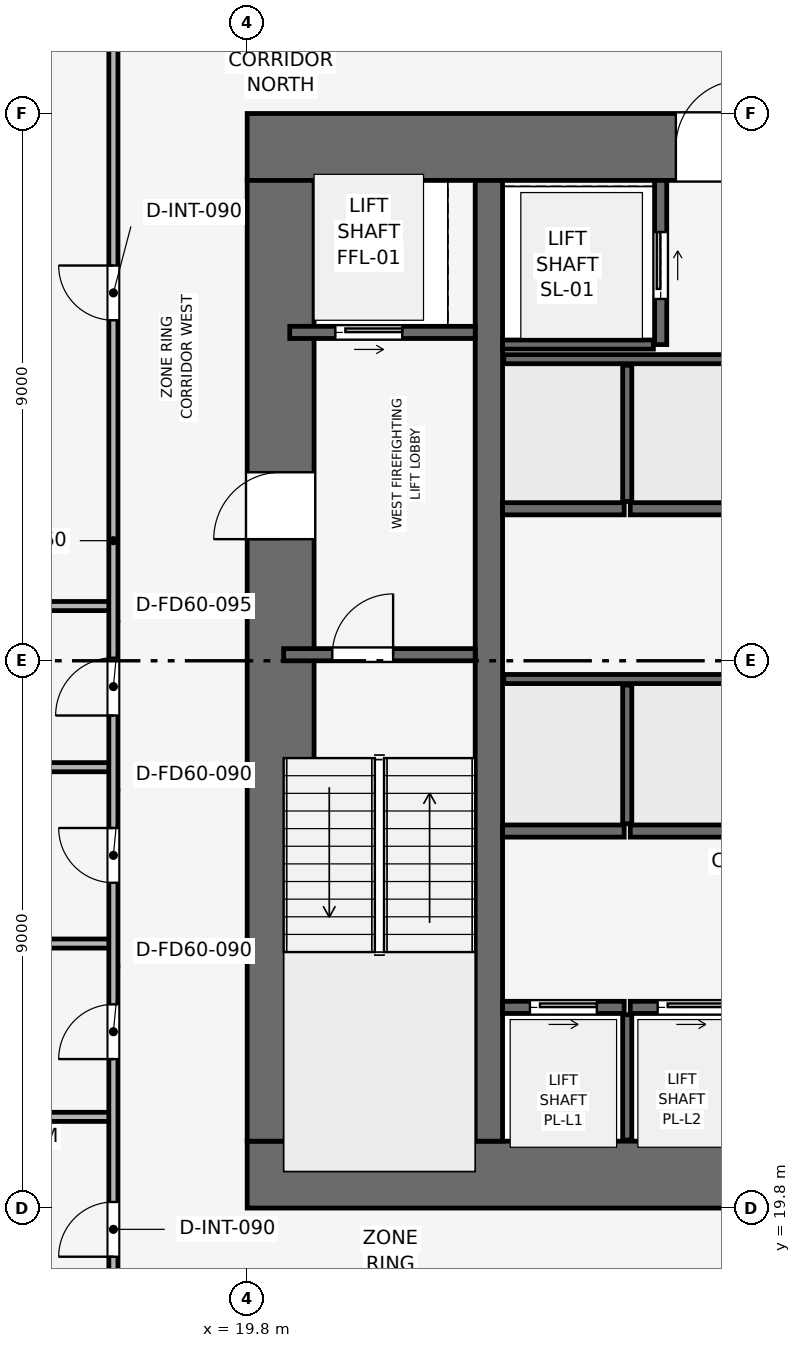
"""IFC4 building model, lengths in metres.
Left out: names, types, materials, properties, quantities, classifications, styles, units other than length and angle.
Written with IfcOpenShell. Run it as: python <this file> out.ifc"""

import sys

from ifc_helpers import new_model, si_unit, direction, frame, frame_2d, origin, place, context, subcontext, project, spatial, rectangle, extrude, element, fill, save


model = new_model("IFC4")
c1 = context("Model", 3, precision=1e-05, world=origin(), true_north=direction((0.0, 1.0)))
c2 = subcontext(c1, "Body", "Model", "MODEL_VIEW")
j1 = project(units=[si_unit("LENGTHUNIT", "METRE"), si_unit("PLANEANGLEUNIT", "RADIAN")], contexts=[c1])
p1 = place(None, origin())
s1 = spatial("IfcSite", under=j1, at=p1, CompositionType="ELEMENT")
p2 = place(p1, origin())
s2 = spatial("IfcBuilding", under=s1, at=p2, CompositionType="ELEMENT")
p3 = place(p2, frame((0.0, 0.0, 104.1)))
s3 = spatial("IfcBuildingStorey", under=s2, at=p3, CompositionType="ELEMENT", Elevation=104.1)
p4 = place(p3, frame((19.8, 20.35, 0.0), z_axis=(0.0, 0.0, 1.0), x_axis=(1.0, 0.0, 0.0)))
e1 = element("IfcWall", 1, at=p4, inside=s3, PredefinedType="SHEAR", context=c2, shape_type="SweptSolid", body=[
    extrude(rectangle(XDim=18.0, YDim=1.1, at=frame_2d((9.0, 0.0))), origin(), (0.0, 0.0, 1.0), 3.9),
])
p5 = place(p4, frame((8.4, 0.0, 0.0)))
e2 = element("IfcOpeningElement", 2, at=p5, cuts=e1, PredefinedType="OPENING", context=c2, shape_type="SweptSolid", body=[
    extrude(rectangle(XDim=1.2, YDim=2.2, at=frame_2d((0.6, 1.1))), frame((0.0, 0.56, 0.0), z_axis=(0.0, -1.0, 0.0), x_axis=(1.0, 0.0, 0.0)), (0.0, 0.0, 1.0), 1.12),
])
p6 = place(p3, frame((19.8, 37.25, 0.0), z_axis=(0.0, 0.0, 1.0), x_axis=(1.0, 0.0, 0.0)))
e3 = element("IfcWall", 3, at=p6, inside=s3, PredefinedType="SHEAR", context=c2, shape_type="SweptSolid", body=[
    extrude(rectangle(XDim=18.0, YDim=1.1, at=frame_2d((9.0, 0.0))), origin(), (0.0, 0.0, 1.0), 3.9),
])
p7 = place(p6, frame((7.05, 0.0, 0.0)))
e4 = element("IfcOpeningElement", 4, at=p7, cuts=e3, PredefinedType="OPENING", context=c2, shape_type="SweptSolid", body=[
    extrude(rectangle(XDim=1.1, YDim=2.15, at=frame_2d((0.55, 1.075))), frame((0.0, 0.56, 0.0), z_axis=(0.0, -1.0, 0.0), x_axis=(1.0, 0.0, 0.0)), (0.0, 0.0, 1.0), 1.12),
])
p8 = place(p3, frame((20.35, 20.9, 0.0), z_axis=(0.0, 0.0, 1.0), x_axis=(0.0, 1.0, 0.0)))
e5 = element("IfcWall", 5, at=p8, inside=s3, PredefinedType="SHEAR", context=c2, shape_type="SweptSolid", body=[
    extrude(rectangle(XDim=15.8, YDim=1.1, at=frame_2d((7.9, 0.0))), origin(), (0.0, 0.0, 1.0), 3.9),
])
p9 = place(p8, frame((9.9, 0.0, 0.0)))
e6 = element("IfcOpeningElement", 6, at=p9, cuts=e5, PredefinedType="OPENING", context=c2, shape_type="SweptSolid", body=[
    extrude(rectangle(XDim=1.1, YDim=2.15, at=frame_2d((0.55, 1.075))), frame((0.0, 0.56, 0.0), z_axis=(0.0, -1.0, 0.0), x_axis=(1.0, 0.0, 0.0)), (0.0, 0.0, 1.0), 1.12),
])
p10 = place(p3, frame((23.775, 20.9, 0.0), z_axis=(0.0, 0.0, 1.0), x_axis=(0.0, 1.0, 0.0)))
e7 = element("IfcWall", 7, at=p10, inside=s3, PredefinedType="SHEAR", context=c2, shape_type="SweptSolid", body=[
    extrude(rectangle(XDim=15.8, YDim=0.45, at=frame_2d((7.9, 0.0))), origin(), (0.0, 0.0, 1.0), 3.9),
])
p11 = place(p3, frame((20.4, 28.9, 0.0), z_axis=(0.0, 0.0, 1.0), x_axis=(1.0, 0.0, 0.0)))
e8 = element("IfcWall", 8, at=p11, inside=s3, PredefinedType="SHEAR", context=c2, shape_type="SweptSolid", body=[
    extrude(rectangle(XDim=3.15, YDim=0.2, at=frame_2d((1.575, 0.0))), origin(), (0.0, 0.0, 1.0), 3.54),
])
p12 = place(p11, frame((0.8, 0.0, 0.0)))
e9 = element("IfcOpeningElement", 9, at=p12, cuts=e8, PredefinedType="OPENING", context=c2, shape_type="SweptSolid", body=[
    extrude(rectangle(XDim=1.0, YDim=2.1, at=frame_2d((0.5, 1.05))), frame((0.0, 0.11, 0.0), z_axis=(0.0, -1.0, 0.0), x_axis=(1.0, 0.0, 0.0)), (0.0, 0.0, 1.0), 0.22),
])
p13 = place(p3, frame((20.5, 34.2, 0.0), z_axis=(0.0, 0.0, 1.0), x_axis=(1.0, 0.0, 0.0)))
e10 = element("IfcWall", 10, at=p13, inside=s3, PredefinedType="SHEAR", context=c2, shape_type="SweptSolid", body=[
    extrude(rectangle(XDim=3.05, YDim=0.2, at=frame_2d((1.525, 0.0))), origin(), (0.0, 0.0, 1.0), 3.54),
])
p14 = place(p13, frame((0.75, 0.0, 0.0)))
e11 = element("IfcOpeningElement", 11, at=p14, cuts=e10, PredefinedType="OPENING", context=c2, shape_type="SweptSolid", body=[
    extrude(rectangle(XDim=1.1, YDim=2.15, at=frame_2d((0.55, 1.075))), frame((0.0, 0.11, 0.0), z_axis=(0.0, -1.0, 0.0), x_axis=(1.0, 0.0, 0.0)), (0.0, 0.0, 1.0), 0.22),
])
p15 = place(p3, frame((26.6, 34.0, 0.0), z_axis=(0.0, 0.0, 1.0), x_axis=(0.0, 1.0, 0.0)))
e12 = element("IfcWall", 12, at=p15, inside=s3, PredefinedType="SHEAR", context=c2, shape_type="SweptSolid", body=[
    extrude(rectangle(XDim=2.7, YDim=0.2, at=frame_2d((1.35, 0.0))), origin(), (0.0, 0.0, 1.0), 3.54),
])
p16 = place(p15, frame((0.75, 0.0, 0.0)))
e13 = element("IfcOpeningElement", 13, at=p16, cuts=e12, PredefinedType="OPENING", context=c2, shape_type="SweptSolid", body=[
    extrude(rectangle(XDim=1.1, YDim=2.15, at=frame_2d((0.55, 1.075))), frame((0.0, 0.11, 0.0), z_axis=(0.0, -1.0, 0.0), x_axis=(1.0, 0.0, 0.0)), (0.0, 0.0, 1.0), 0.22),
])
p17 = place(p3, frame((24.0, 34.0, 0.0), z_axis=(0.0, 0.0, 1.0), x_axis=(1.0, 0.0, 0.0)))
e14 = element("IfcWall", 14, at=p17, inside=s3, PredefinedType="SHEAR", context=c2, shape_type="SweptSolid", body=[
    extrude(rectangle(XDim=2.48, YDim=0.15, at=frame_2d((1.24, 0.0))), origin(), (0.0, 0.0, 1.0), 3.54),
])
p18 = place(p3, frame((24.0, 23.1, 0.0), z_axis=(0.0, 0.0, 1.0), x_axis=(1.0, 0.0, 0.0)))
e15 = element("IfcWall", 15, at=p18, inside=s3, PredefinedType="SHEAR", context=c2, shape_type="SweptSolid", body=[
    extrude(rectangle(XDim=2.0, YDim=0.2, at=frame_2d((1.0, 0.0))), origin(), (0.0, 0.0, 1.0), 3.54),
])
p19 = place(p18, frame((0.45, 0.0, 0.0)))
e16 = element("IfcOpeningElement", 16, at=p19, cuts=e15, PredefinedType="OPENING", context=c2, shape_type="SweptSolid", body=[
    extrude(rectangle(XDim=1.1, YDim=2.15, at=frame_2d((0.55, 1.075))), frame((0.0, 0.11, 0.0), z_axis=(0.0, -1.0, 0.0), x_axis=(1.0, 0.0, 0.0)), (0.0, 0.0, 1.0), 0.22),
])
p20 = place(p3, frame((26.1, 23.1, 0.0), z_axis=(0.0, 0.0, 1.0), x_axis=(1.0, 0.0, 0.0)))
e17 = element("IfcWall", 17, at=p20, inside=s3, PredefinedType="SHEAR", context=c2, shape_type="SweptSolid", body=[
    extrude(rectangle(XDim=2.0, YDim=0.2, at=frame_2d((1.0, 0.0))), origin(), (0.0, 0.0, 1.0), 3.54),
])
p21 = place(p20, frame((0.45, 0.0, 0.0)))
e18 = element("IfcOpeningElement", 18, at=p21, cuts=e17, PredefinedType="OPENING", context=c2, shape_type="SweptSolid", body=[
    extrude(rectangle(XDim=1.1, YDim=2.15, at=frame_2d((0.55, 1.075))), frame((0.0, 0.11, 0.0), z_axis=(0.0, -1.0, 0.0), x_axis=(1.0, 0.0, 0.0)), (0.0, 0.0, 1.0), 0.22),
])
for number, where, z_axis, x_axis in (
    (19, (24.0, 26.0, 0.0), (0.0, 0.0, 1.0), (1.0, 0.0, 0.0)),
    (20, (26.1, 26.0, 0.0), (0.0, 0.0, 1.0), (1.0, 0.0, 0.0)),
    (21, (24.0, 31.3, 0.0), (0.0, 0.0, 1.0), (1.0, 0.0, 0.0)),
    (22, (26.1, 31.3, 0.0), (0.0, 0.0, 1.0), (1.0, 0.0, 0.0)),
):
    element("IfcWall", number, at=place(p3, frame(where, z_axis=z_axis, x_axis=x_axis)), inside=s3, PredefinedType="SHEAR", context=c2, shape_type="SweptSolid", body=[
        extrude(rectangle(XDim=2.0, YDim=0.2, at=frame_2d((1.0, 0.0))), origin(), (0.0, 0.0, 1.0), 3.54),
    ])
p22 = place(p3, frame((26.05, 20.92, 0.0), z_axis=(0.0, 0.0, 1.0), x_axis=(0.0, 1.0, 0.0)))
e23 = element("IfcWall", 23, at=p22, inside=s3, PredefinedType="SHEAR", context=c2, shape_type="SweptSolid", body=[
    extrude(rectangle(XDim=2.06, YDim=0.15, at=frame_2d((1.03, 0.0))), origin(), (0.0, 0.0, 1.0), 3.54),
])
p23 = place(p3, frame((24.02, 28.5, 0.0), z_axis=(0.0, 0.0, 1.0), x_axis=(1.0, 0.0, 0.0)))
e24 = element("IfcWall", 24, at=p23, inside=s3, PredefinedType="SHEAR", context=c2, shape_type="SweptSolid", body=[
    extrude(rectangle(XDim=4.08, YDim=0.15, at=frame_2d((2.04, 0.0))), origin(), (0.0, 0.0, 1.0), 3.54),
])
p24 = place(p3, frame((26.05, 26.12, 0.0), z_axis=(0.0, 0.0, 1.0), x_axis=(0.0, 1.0, 0.0)))
e25 = element("IfcWall", 25, at=p24, inside=s3, PredefinedType="SHEAR", context=c2, shape_type="SweptSolid", body=[
    extrude(rectangle(XDim=2.28, YDim=0.15, at=frame_2d((1.14, 0.0))), origin(), (0.0, 0.0, 1.0), 3.54),
])
p25 = place(p3, frame((24.02, 33.76, 0.0), z_axis=(0.0, 0.0, 1.0), x_axis=(1.0, 0.0, 0.0)))
e26 = element("IfcWall", 26, at=p25, inside=s3, PredefinedType="SHEAR", context=c2, shape_type="SweptSolid", body=[
    extrude(rectangle(XDim=4.08, YDim=0.15, at=frame_2d((2.04, 0.0))), origin(), (0.0, 0.0, 1.0), 3.54),
])
p26 = place(p3, frame((26.05, 31.42, 0.0), z_axis=(0.0, 0.0, 1.0), x_axis=(0.0, 1.0, 0.0)))
e27 = element("IfcWall", 27, at=p26, inside=s3, PredefinedType="SHEAR", context=c2, shape_type="SweptSolid", body=[
    extrude(rectangle(XDim=2.24, YDim=0.15, at=frame_2d((1.12, 0.0))), origin(), (0.0, 0.0, 1.0), 3.54),
])
p27 = place(p3, frame((1.03, 21.3, 0.0), z_axis=(0.0, 0.0, 1.0), x_axis=(1.0, 0.0, 0.0)))
e28 = element("IfcWall", 28, at=p27, inside=s3, PredefinedType="PARTITIONING", context=c2, shape_type="SweptSolid", body=[
    extrude(rectangle(XDim=16.57, YDim=0.15, at=frame_2d((8.285, 0.0))), origin(), (0.0, 0.0, 1.0), 2.825),
])
p28 = place(p27, frame((6.235, 0.0, 0.0)))
e29 = element("IfcOpeningElement", 29, at=p28, cuts=e28, PredefinedType="OPENING", context=c2, shape_type="SweptSolid", body=[
    extrude(rectangle(XDim=0.9, YDim=2.1, at=frame_2d((0.45, 1.05))), frame((0.0, 0.085, 0.0), z_axis=(0.0, -1.0, 0.0), x_axis=(1.0, 0.0, 0.0)), (0.0, 0.0, 1.0), 0.17),
])
p29 = place(p3, frame((1.03, 29.7, 0.0), z_axis=(0.0, 0.0, 1.0), x_axis=(1.0, 0.0, 0.0)))
e30 = element("IfcWall", 30, at=p29, inside=s3, PredefinedType="PARTITIONING", context=c2, shape_type="SweptSolid", body=[
    extrude(rectangle(XDim=16.57, YDim=0.15, at=frame_2d((8.285, 0.0))), origin(), (0.0, 0.0, 1.0), 2.825),
])
for number, where, z_axis, x_axis in (
    (31, (14.4, 24.15, 0.0), (0.0, 0.0, 1.0), (1.0, 0.0, 0.0)),
    (32, (14.4, 27.05, 0.0), (0.0, 0.0, 1.0), (1.0, 0.0, 0.0)),
):
    element("IfcWall", number, at=place(p3, frame(where, z_axis=z_axis, x_axis=x_axis)), inside=s3, PredefinedType="PARTITIONING", context=c2, shape_type="SweptSolid", body=[
        extrude(rectangle(XDim=3.2, YDim=0.15, at=frame_2d((1.6, 0.0))), origin(), (0.0, 0.0, 1.0), 3.54),
    ])
p30 = place(p3, frame((17.6, 17.6, 0.0), z_axis=(0.0, 0.0, 1.0), x_axis=(0.0, 1.0, 0.0)))
e33 = element("IfcWall", 33, at=p30, inside=s3, PredefinedType="PARTITIONING", context=c2, shape_type="SweptSolid", body=[
    extrude(rectangle(XDim=22.4, YDim=0.15, at=frame_2d((11.2, 0.0))), origin(), (0.0, 0.0, 1.0), 2.975),
])
p31 = place(p30, frame((1.4, 0.0, 0.0)))
e34 = element("IfcOpeningElement", 34, at=p31, cuts=e33, PredefinedType="OPENING", context=c2, shape_type="SweptSolid", body=[
    extrude(rectangle(XDim=0.9, YDim=2.1, at=frame_2d((0.45, 1.05))), frame((0.0, 0.085, 0.0), z_axis=(0.0, -1.0, 0.0), x_axis=(1.0, 0.0, 0.0)), (0.0, 0.0, 1.0), 0.17),
])
p32 = place(p30, frame((4.65, 0.0, 0.0)))
e35 = element("IfcOpeningElement", 35, at=p32, cuts=e33, PredefinedType="OPENING", context=c2, shape_type="SweptSolid", body=[
    extrude(rectangle(XDim=0.9, YDim=2.1, at=frame_2d((0.45, 1.05))), frame((0.0, 0.085, 0.0), z_axis=(0.0, -1.0, 0.0), x_axis=(1.0, 0.0, 0.0)), (0.0, 0.0, 1.0), 0.17),
])
p33 = place(p30, frame((7.55, 0.0, 0.0)))
e36 = element("IfcOpeningElement", 36, at=p33, cuts=e33, PredefinedType="OPENING", context=c2, shape_type="SweptSolid", body=[
    extrude(rectangle(XDim=0.9, YDim=2.1, at=frame_2d((0.45, 1.05))), frame((0.0, 0.085, 0.0), z_axis=(0.0, -1.0, 0.0), x_axis=(1.0, 0.0, 0.0)), (0.0, 0.0, 1.0), 0.17),
])
p34 = place(p30, frame((10.3, 0.0, 0.0)))
e37 = element("IfcOpeningElement", 37, at=p34, cuts=e33, PredefinedType="OPENING", context=c2, shape_type="SweptSolid", body=[
    extrude(rectangle(XDim=0.95, YDim=2.1, at=frame_2d((0.475, 1.05))), frame((0.0, 0.085, 0.0), z_axis=(0.0, -1.0, 0.0), x_axis=(1.0, 0.0, 0.0)), (0.0, 0.0, 1.0), 0.17),
])
p35 = place(p30, frame((16.8, 0.0, 0.0)))
e38 = element("IfcOpeningElement", 38, at=p35, cuts=e33, PredefinedType="OPENING", context=c2, shape_type="SweptSolid", body=[
    extrude(rectangle(XDim=0.9, YDim=2.1, at=frame_2d((0.45, 1.05))), frame((0.0, 0.085, 0.0), z_axis=(0.0, -1.0, 0.0), x_axis=(1.0, 0.0, 0.0)), (0.0, 0.0, 1.0), 0.17),
])
p36 = place(p12, origin())
e39 = element("IfcDoor", 39, at=p36, inside=s3, OperationType="SINGLE_SWING_RIGHT", PredefinedType="DOOR", context=c2, shape_type="SweptSolid", body=[
    extrude(rectangle(XDim=1.0, YDim=2.1, at=frame_2d((0.5, 1.05))), frame((0.0, 0.025, 0.0), z_axis=(0.0, -1.0, 0.0), x_axis=(1.0, 0.0, 0.0)), (0.0, 0.0, 1.0), 0.05),
])
fill(e9, e39)
p37 = place(p14, origin())
e40 = element("IfcDoor", 40, at=p37, inside=s3, OperationType="SLIDING_TO_RIGHT", PredefinedType="DOOR", context=c2, shape_type="SweptSolid", body=[
    extrude(rectangle(XDim=1.1, YDim=2.15, at=frame_2d((0.55, 1.075))), frame((0.0, 0.025, 0.0), z_axis=(0.0, -1.0, 0.0), x_axis=(1.0, 0.0, 0.0)), (0.0, 0.0, 1.0), 0.05),
])
fill(e11, e40)
p38 = place(p16, origin())
e41 = element("IfcDoor", 41, at=p38, inside=s3, OperationType="SLIDING_TO_RIGHT", PredefinedType="DOOR", context=c2, shape_type="SweptSolid", body=[
    extrude(rectangle(XDim=1.1, YDim=2.15, at=frame_2d((0.55, 1.075))), frame((0.0, 0.025, 0.0), z_axis=(0.0, -1.0, 0.0), x_axis=(1.0, 0.0, 0.0)), (0.0, 0.0, 1.0), 0.05),
])
fill(e13, e41)
p39 = place(p19, origin())
e42 = element("IfcDoor", 42, at=p39, inside=s3, OperationType="SLIDING_TO_RIGHT", PredefinedType="DOOR", context=c2, shape_type="SweptSolid", body=[
    extrude(rectangle(XDim=1.1, YDim=2.15, at=frame_2d((0.55, 1.075))), frame((0.0, 0.025, 0.0), z_axis=(0.0, -1.0, 0.0), x_axis=(1.0, 0.0, 0.0)), (0.0, 0.0, 1.0), 0.05),
])
fill(e16, e42)
p40 = place(p21, origin())
e43 = element("IfcDoor", 43, at=p40, inside=s3, OperationType="SLIDING_TO_RIGHT", PredefinedType="DOOR", context=c2, shape_type="SweptSolid", body=[
    extrude(rectangle(XDim=1.1, YDim=2.15, at=frame_2d((0.55, 1.075))), frame((0.0, 0.025, 0.0), z_axis=(0.0, -1.0, 0.0), x_axis=(1.0, 0.0, 0.0)), (0.0, 0.0, 1.0), 0.05),
])
fill(e18, e43)
p41 = place(p31, origin())
e44 = element("IfcDoor", 44, at=p41, inside=s3, OperationType="SINGLE_SWING_LEFT", PredefinedType="DOOR", context=c2, shape_type="SweptSolid", body=[
    extrude(rectangle(XDim=0.9, YDim=2.1, at=frame_2d((0.45, 1.05))), frame((0.0, 0.025, 0.0), z_axis=(0.0, -1.0, 0.0), x_axis=(1.0, 0.0, 0.0)), (0.0, 0.0, 1.0), 0.05),
])
fill(e34, e44)
p42 = place(p32, origin())
e45 = element("IfcDoor", 45, at=p42, inside=s3, OperationType="SINGLE_SWING_LEFT", PredefinedType="DOOR", context=c2, shape_type="SweptSolid", body=[
    extrude(rectangle(XDim=0.9, YDim=2.1, at=frame_2d((0.45, 1.05))), frame((0.0, 0.025, 0.0), z_axis=(0.0, -1.0, 0.0), x_axis=(1.0, 0.0, 0.0)), (0.0, 0.0, 1.0), 0.05),
])
fill(e35, e45)
p43 = place(p33, origin())
e46 = element("IfcDoor", 46, at=p43, inside=s3, OperationType="SINGLE_SWING_RIGHT", PredefinedType="DOOR", context=c2, shape_type="SweptSolid", body=[
    extrude(rectangle(XDim=0.9, YDim=2.1, at=frame_2d((0.45, 1.05))), frame((0.0, 0.025, 0.0), z_axis=(0.0, -1.0, 0.0), x_axis=(1.0, 0.0, 0.0)), (0.0, 0.0, 1.0), 0.05),
])
fill(e36, e46)
p44 = place(p34, origin())
e47 = element("IfcDoor", 47, at=p44, inside=s3, OperationType="SINGLE_SWING_LEFT", PredefinedType="DOOR", context=c2, shape_type="SweptSolid", body=[
    extrude(rectangle(XDim=0.95, YDim=2.1, at=frame_2d((0.475, 1.05))), frame((0.0, 0.025, 0.0), z_axis=(0.0, -1.0, 0.0), x_axis=(1.0, 0.0, 0.0)), (0.0, 0.0, 1.0), 0.05),
])
fill(e37, e47)
p45 = place(p35, origin())
e48 = element("IfcDoor", 48, at=p45, inside=s3, OperationType="SINGLE_SWING_RIGHT", PredefinedType="DOOR", context=c2, shape_type="SweptSolid", body=[
    extrude(rectangle(XDim=0.9, YDim=2.1, at=frame_2d((0.45, 1.05))), frame((0.0, 0.025, 0.0), z_axis=(0.0, -1.0, 0.0), x_axis=(1.0, 0.0, 0.0)), (0.0, 0.0, 1.0), 0.05),
])
fill(e38, e48)
p46 = place(p9, origin())
e49 = element("IfcDoor", 49, at=p46, inside=s3, OperationType="SINGLE_SWING_LEFT", PredefinedType="DOOR", context=c2, shape_type="SweptSolid", body=[
    extrude(rectangle(XDim=1.1, YDim=2.15, at=frame_2d((0.55, 1.075))), frame((0.0, 0.025, 0.0), z_axis=(0.0, -1.0, 0.0), x_axis=(1.0, 0.0, 0.0)), (0.0, 0.0, 1.0), 0.05),
])
fill(e6, e49)
p47 = place(p7, origin())
e50 = element("IfcDoor", 50, at=p47, inside=s3, OperationType="SINGLE_SWING_RIGHT", PredefinedType="DOOR", context=c2, shape_type="SweptSolid", body=[
    extrude(rectangle(XDim=1.1, YDim=2.15, at=frame_2d((0.55, 1.075))), frame((0.0, 0.025, 0.0), z_axis=(0.0, -1.0, 0.0), x_axis=(1.0, 0.0, 0.0)), (0.0, 0.0, 1.0), 0.05),
])
fill(e4, e50)
save(model, sys.argv[1])
